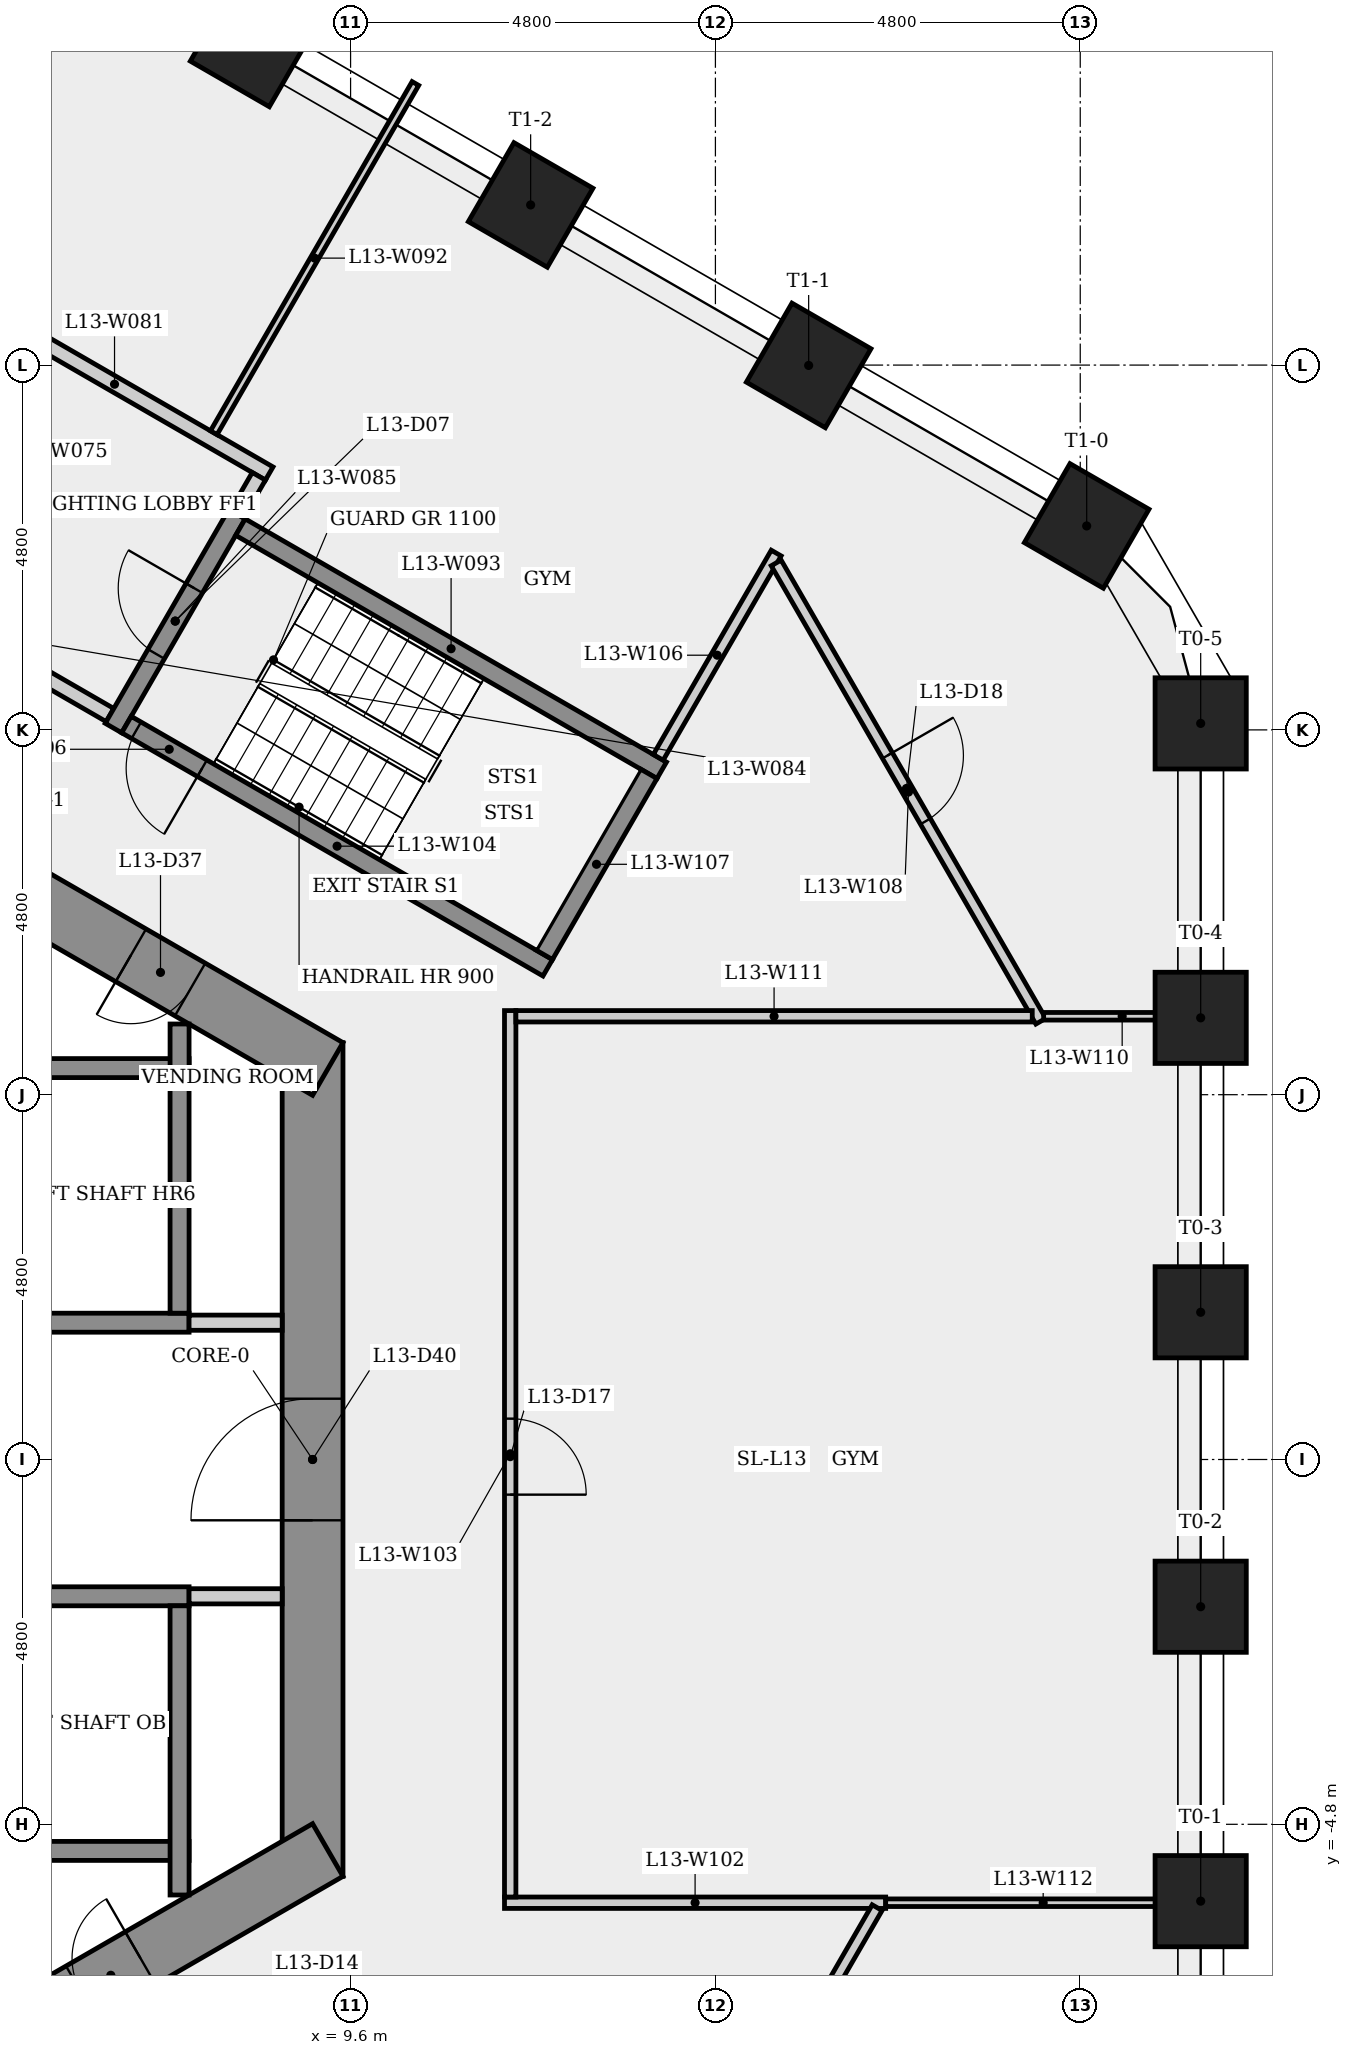
"""IFC4 building model, lengths in metres.
Left out: names, types, materials, properties, quantities, classifications, styles, units other than length and angle.
Written with IfcOpenShell. Run it as: python <this file> out.ifc"""

import sys

from ifc_helpers import new_model, si_unit, direction, frame, frame_2d, origin, origin_2d, place, context, subcontext, project, spatial, rectangle, extrude, element, fill, save


model = new_model("IFC4")
c1 = context("Model", 3, precision=1e-05, world=origin(), true_north=direction((0.0, 1.0)))
c2 = subcontext(c1, "Body", "Model", "MODEL_VIEW")
j1 = project(units=[si_unit("LENGTHUNIT", "METRE"), si_unit("PLANEANGLEUNIT", "RADIAN")], contexts=[c1])
p1 = place(None, origin())
s1 = spatial("IfcSite", under=j1, at=p1, CompositionType="ELEMENT")
p2 = place(p1, origin())
s2 = spatial("IfcBuilding", under=s1, at=p2, CompositionType="ELEMENT")
p3 = place(p2, frame((0.0, 0.0, 52.7)))
s3 = spatial("IfcBuildingStorey", under=s2, at=p3, CompositionType="ELEMENT", Elevation=52.7)
p4 = place(p3, frame((9.1, -5.485, 0.0), z_axis=(0.0, 0.0, 1.0), x_axis=(0.0, 1.0, 0.0)))
e1 = element("IfcWall", 1, at=p4, inside=s3, PredefinedType="SHEAR", context=c2, shape_type="SweptSolid", body=[
    extrude(rectangle(XDim=10.97, YDim=0.8, at=frame_2d((5.485, 0.0))), origin(), (0.0, 0.0, 1.0), 3.4),
])
p5 = place(p4, frame((4.685, 0.0, 0.0)))
e2 = element("IfcOpeningElement", 2, at=p5, cuts=e1, PredefinedType="OPENING", context=c2, shape_type="SweptSolid", body=[
    extrude(rectangle(XDim=1.6, YDim=2.1, at=frame_2d((0.8, 1.05))), frame((0.0, 0.41, 0.0), z_axis=(0.0, -1.0, 0.0), x_axis=(1.0, 0.0, 0.0)), (0.0, 0.0, 1.0), 0.82),
])
p6 = place(p3, frame((9.3, 5.138, 0.0), z_axis=(0.0, 0.0, 1.0), x_axis=(-0.866023993627, 0.500002442456, 0.0)))
e3 = element("IfcWall", 3, at=p6, inside=s3, PredefinedType="SHEAR", context=c2, shape_type="SweptSolid", body=[
    extrude(rectangle(XDim=10.97, YDim=0.8, at=frame_2d((5.485, 0.0))), origin(), (0.0, 0.0, 1.0), 3.4),
])
p7 = place(p6, frame((8.326, 0.0, 0.0)))
e4 = element("IfcOpeningElement", 4, at=p7, cuts=e3, PredefinedType="OPENING", context=c2, shape_type="SweptSolid", body=[
    extrude(rectangle(XDim=0.9, YDim=2.1, at=frame_2d((0.45, 1.05))), frame((0.0, 0.41, 0.0), z_axis=(0.0, -1.0, 0.0), x_axis=(1.0, 0.0, 0.0)), (0.0, 0.0, 1.0), 0.82),
])
p8 = place(p6, frame((2.091, 0.0, 0.0)))
e5 = element("IfcOpeningElement", 5, at=p8, cuts=e3, PredefinedType="OPENING", context=c2, shape_type="SweptSolid", body=[
    extrude(rectangle(XDim=0.9, YDim=2.1, at=frame_2d((0.45, 1.05))), frame((0.0, 0.41, 0.0), z_axis=(0.0, -1.0, 0.0), x_axis=(1.0, 0.0, 0.0)), (0.0, 0.0, 1.0), 0.82),
])
p9 = place(p3, frame((-0.2, -10.623, 0.0), z_axis=(0.0, 0.0, 1.0), x_axis=(0.866023993627, 0.500002442456, 0.0)))
e6 = element("IfcWall", 6, at=p9, inside=s3, PredefinedType="SHEAR", context=c2, shape_type="SweptSolid", body=[
    extrude(rectangle(XDim=10.97, YDim=0.8, at=frame_2d((5.485, 0.0))), origin(), (0.0, 0.0, 1.0), 3.4),
])
p10 = place(p9, frame((7.224, 0.0, 0.0)))
e7 = element("IfcOpeningElement", 7, at=p10, cuts=e6, PredefinedType="OPENING", context=c2, shape_type="SweptSolid", body=[
    extrude(rectangle(XDim=0.9, YDim=2.1, at=frame_2d((0.45, 1.05))), frame((0.0, 0.41, 0.0), z_axis=(0.0, -1.0, 0.0), x_axis=(1.0, 0.0, 0.0)), (0.0, 0.0, 1.0), 0.82),
])
for number, where, z_axis, x_axis in (
    (8, (20.785, -5.811, 0.0), (0.0, 0.0, 1.0), (1.0, 0.0, 0.0)),
    (9, (20.785, -1.937, 0.0), (0.0, 0.0, 1.0), (1.0, 0.0, 0.0)),
    (10, (20.785, 1.937, 0.0), (0.0, 0.0, 1.0), (1.0, 0.0, 0.0)),
    (11, (20.785, 5.811, 0.0), (0.0, 0.0, 1.0), (1.0, 0.0, 0.0)),
    (12, (20.785, 9.686, 0.0), (0.0, 0.0, 1.0), (1.0, 0.0, 0.0)),
    (13, (19.285, 12.283, 0.0), (0.0, 0.0, 1.0), (0.5, 0.866, 0.0)),
    (14, (15.627, 14.395, 0.0), (0.0, 0.0, 1.0), (0.5, 0.866, 0.0)),
    (15, (11.969, 16.507, 0.0), (0.0, 0.0, 1.0), (0.5, 0.866, 0.0)),
    (16, (8.311, 18.619, 0.0), (0.0, 0.0, 1.0), (0.5, 0.866, 0.0)),
):
    element("IfcColumn", number, at=place(p3, frame(where, z_axis=z_axis, x_axis=x_axis)), inside=s3, PredefinedType="COLUMN", context=c2, shape_type="SweptSolid", body=[
        extrude(rectangle(XDim=1.2, YDim=1.2, at=origin_2d()), origin(), (0.0, 0.0, 1.0), 3.4),
    ])
p11 = place(p3, frame((-7.475, 1.8, 0.0), z_axis=(0.0, 0.0, 1.0), x_axis=(1.0, 0.0, 0.0)))
e17 = element("IfcWall", 17, at=p11, inside=s3, PredefinedType="SHEAR", context=c2, shape_type="SweptSolid", body=[
    extrude(rectangle(XDim=14.95, YDim=0.25, at=frame_2d((7.475, 0.0))), origin(), (0.0, 0.0, 1.0), 3.05),
])
for number, where, z_axis, x_axis in (
    (18, (-7.225, 5.15, 0.0), (0.0, 0.0, 1.0), (1.0, 0.0, 0.0)),
    (19, (-7.225, -5.15, 0.0), (0.0, 0.0, 1.0), (1.0, 0.0, 0.0)),
):
    element("IfcWall", number, at=place(p3, frame(where, z_axis=z_axis, x_axis=x_axis)), inside=s3, PredefinedType="SHEAR", context=c2, shape_type="SweptSolid", body=[
        extrude(rectangle(XDim=14.7, YDim=0.25, at=frame_2d((7.35, 0.0))), origin(), (0.0, 0.0, 1.0), 3.05),
    ])
p12 = place(p3, frame((-7.225, -1.8, 0.0), z_axis=(0.0, 0.0, 1.0), x_axis=(1.0, 0.0, 0.0)))
e20 = element("IfcWall", 20, at=p12, inside=s3, PredefinedType="SHEAR", context=c2, shape_type="SweptSolid", body=[
    extrude(rectangle(XDim=14.7, YDim=0.25, at=frame_2d((7.35, 0.0))), origin(), (0.0, 0.0, 1.0), 3.05),
])
p13 = place(p12, frame((0.597, 0.0, 0.0)))
e21 = element("IfcOpeningElement", 21, at=p13, cuts=e20, PredefinedType="OPENING", context=c2, shape_type="SweptSolid", body=[
    extrude(rectangle(XDim=1.1, YDim=2.1, at=frame_2d((0.55, 1.05))), frame((0.0, 0.135, 0.0), z_axis=(0.0, -1.0, 0.0), x_axis=(1.0, 0.0, 0.0)), (0.0, 0.0, 1.0), 0.27),
])
p14 = place(p12, frame((3.0, 0.0, 0.0)))
e22 = element("IfcOpeningElement", 22, at=p14, cuts=e20, PredefinedType="OPENING", context=c2, shape_type="SweptSolid", body=[
    extrude(rectangle(XDim=1.1, YDim=2.1, at=frame_2d((0.55, 1.05))), frame((0.0, 0.135, 0.0), z_axis=(0.0, -1.0, 0.0), x_axis=(1.0, 0.0, 0.0)), (0.0, 0.0, 1.0), 0.27),
])
p15 = place(p12, frame((5.45, 0.0, 0.0)))
e23 = element("IfcOpeningElement", 23, at=p15, cuts=e20, PredefinedType="OPENING", context=c2, shape_type="SweptSolid", body=[
    extrude(rectangle(XDim=1.1, YDim=2.1, at=frame_2d((0.55, 1.05))), frame((0.0, 0.135, 0.0), z_axis=(0.0, -1.0, 0.0), x_axis=(1.0, 0.0, 0.0)), (0.0, 0.0, 1.0), 0.27),
])
p16 = place(p12, frame((7.9, 0.0, 0.0)))
e24 = element("IfcOpeningElement", 24, at=p16, cuts=e20, PredefinedType="OPENING", context=c2, shape_type="SweptSolid", body=[
    extrude(rectangle(XDim=1.1, YDim=2.1, at=frame_2d((0.55, 1.05))), frame((0.0, 0.135, 0.0), z_axis=(0.0, -1.0, 0.0), x_axis=(1.0, 0.0, 0.0)), (0.0, 0.0, 1.0), 0.27),
])
p17 = place(p12, frame((10.35, 0.0, 0.0)))
e25 = element("IfcOpeningElement", 25, at=p17, cuts=e20, PredefinedType="OPENING", context=c2, shape_type="SweptSolid", body=[
    extrude(rectangle(XDim=1.1, YDim=2.1, at=frame_2d((0.55, 1.05))), frame((0.0, 0.135, 0.0), z_axis=(0.0, -1.0, 0.0), x_axis=(1.0, 0.0, 0.0)), (0.0, 0.0, 1.0), 0.27),
])
p18 = place(p3, frame((4.459, 15.323, 0.0), z_axis=(0.0, 0.0, 1.0), x_axis=(0.866016039709, -0.500016218704, 0.0)))
e26 = element("IfcWall", 26, at=p18, inside=s3, PredefinedType="PARTITIONING", context=c2, shape_type="SweptSolid", body=[
    extrude(rectangle(XDim=4.7, YDim=0.2, at=frame_2d((2.35, 0.0))), origin(), (0.0, 0.0, 1.0), 3.05),
])
p19 = place(p3, frame((6.435, 9.795, 0.0), z_axis=(0.0, 0.0, 1.0), x_axis=(-0.866012907634, 0.500021643343, 0.0)))
e27 = element("IfcWall", 27, at=p19, inside=s3, PredefinedType="PARTITIONING", context=c2, shape_type="SweptSolid", body=[
    extrude(rectangle(XDim=4.45, YDim=0.2, at=frame_2d((2.225, 0.0))), origin(), (0.0, 0.0, 1.0), 3.05),
])
p20 = place(p19, frame((1.675, 0.0, 0.0)))
e28 = element("IfcOpeningElement", 28, at=p20, cuts=e27, PredefinedType="OPENING", context=c2, shape_type="SweptSolid", body=[
    extrude(rectangle(XDim=1.1, YDim=2.1, at=frame_2d((0.55, 1.05))), frame((0.0, 0.11, 0.0), z_axis=(0.0, -1.0, 0.0), x_axis=(1.0, 0.0, 0.0)), (0.0, 0.0, 1.0), 0.22),
])
p21 = place(p3, frame((6.48, 9.624, 0.0), z_axis=(0.0, 0.0, 1.0), x_axis=(0.500017246033, 0.866015446554, 0.0)))
e29 = element("IfcWall", 29, at=p21, inside=s3, PredefinedType="SHEAR", context=c2, shape_type="SweptSolid", body=[
    extrude(rectangle(XDim=3.25, YDim=0.25, at=frame_2d((1.625, 0.0))), origin(), (0.0, 0.0, 1.0), 3.05),
])
p22 = place(p21, frame((1.125, 0.0, 0.0)))
e30 = element("IfcOpeningElement", 30, at=p22, cuts=e29, PredefinedType="OPENING", context=c2, shape_type="SweptSolid", body=[
    extrude(rectangle(XDim=1.0, YDim=2.1, at=frame_2d((0.5, 1.05))), frame((0.0, 0.135, 0.0), z_axis=(0.0, -1.0, 0.0), x_axis=(1.0, 0.0, 0.0)), (0.0, 0.0, 1.0), 0.27),
])
p23 = place(p3, frame((7.475, 1.8, 0.0), z_axis=(0.0, 0.0, 1.0), x_axis=(1.0, 0.0, 0.0)))
e31 = element("IfcWall", 31, at=p23, inside=s3, PredefinedType="PARTITIONING", context=c2, shape_type="SweptSolid", body=[
    extrude(rectangle(XDim=1.225, YDim=0.2, at=frame_2d((0.613, 0.0))), origin(), (0.0, 0.0, 1.0), 3.05),
])
for number, where, z_axis, x_axis in (
    (32, (7.35, -1.925, 0.0), (0.0, 0.0, 1.0), (0.0, -1.0, 0.0)),
    (33, (7.35, 5.73, 0.0), (0.0, 0.0, 1.0), (0.0, -1.0, 0.0)),
):
    element("IfcWall", number, at=place(p3, frame(where, z_axis=z_axis, x_axis=x_axis)), inside=s3, PredefinedType="SHEAR", context=c2, shape_type="SweptSolid", body=[
        extrude(rectangle(XDim=3.805, YDim=0.25, at=frame_2d((1.903, 0.0))), origin(), (0.0, 0.0, 1.0), 3.05),
    ])
p24 = place(p3, frame((7.8, 13.51, 0.0), z_axis=(0.0, 0.0, 1.0), x_axis=(0.499989321821, 0.866031568746, 0.0)))
e34 = element("IfcWall", 34, at=p24, inside=s3, PredefinedType="PARTITIONING", context=c2, shape_type="SweptSolid", body=[
    extrude(rectangle(XDim=5.306, YDim=0.1, at=frame_2d((2.653, 0.0))), origin(), (0.0, 0.0, 1.0), 3.05),
])
p25 = place(p3, frame((8.151, 12.268, 0.0), z_axis=(0.0, 0.0, 1.0), x_axis=(0.866025499775, -0.499999833739, 0.0)))
e35 = element("IfcWall", 35, at=p25, inside=s3, PredefinedType="SHEAR", context=c2, shape_type="SweptSolid", body=[
    extrude(rectangle(XDim=6.4, YDim=0.25, at=frame_2d((3.2, 0.0))), origin(), (0.0, 0.0, 1.0), 3.05),
])
p26 = place(p3, frame((8.393, 12.937, 0.0), z_axis=(0.0, 0.0, 1.0), x_axis=(-0.500065409566, -0.86598763626, 0.0)))
e36 = element("IfcWall", 36, at=p26, inside=s3, PredefinedType="PARTITIONING", context=c2, shape_type="SweptSolid", body=[
    extrude(rectangle(XDim=0.575, YDim=0.2, at=frame_2d((0.288, 0.0))), origin(), (0.0, 0.0, 1.0), 3.05),
])
p27 = place(p3, frame((8.7, -1.8, 0.0), z_axis=(0.0, 0.0, 1.0), x_axis=(-1.0, 0.0, 0.0)))
e37 = element("IfcWall", 37, at=p27, inside=s3, PredefinedType="PARTITIONING", context=c2, shape_type="SweptSolid", body=[
    extrude(rectangle(XDim=1.225, YDim=0.2, at=frame_2d((0.613, 0.0))), origin(), (0.0, 0.0, 1.0), 3.05),
])
p28 = place(p3, frame((11.625, -5.832, 0.0), z_axis=(0.0, 0.0, 1.0), x_axis=(1.0, 0.0, 0.0)))
e38 = element("IfcWall", 38, at=p28, inside=s3, PredefinedType="PARTITIONING", context=c2, shape_type="SweptSolid", body=[
    extrude(rectangle(XDim=5.015, YDim=0.15, at=frame_2d((2.508, 0.0))), origin(), (0.0, 0.0, 1.0), 3.05),
])
p29 = place(p3, frame((11.7, 5.907, 0.0), z_axis=(0.0, 0.0, 1.0), x_axis=(0.0, -1.0, 0.0)))
e39 = element("IfcWall", 39, at=p29, inside=s3, PredefinedType="PARTITIONING", context=c2, shape_type="SweptSolid", body=[
    extrude(rectangle(XDim=11.664, YDim=0.15, at=frame_2d((5.832, 0.0))), origin(), (0.0, 0.0, 1.0), 3.05),
])
p30 = place(p29, frame((5.369, 0.0, 0.0)))
e40 = element("IfcOpeningElement", 40, at=p30, cuts=e39, PredefinedType="OPENING", context=c2, shape_type="SweptSolid", body=[
    extrude(rectangle(XDim=1.0, YDim=2.1, at=frame_2d((0.5, 1.05))), frame((0.0, 0.085, 0.0), z_axis=(0.0, -1.0, 0.0), x_axis=(1.0, 0.0, 0.0)), (0.0, 0.0, 1.0), 0.17),
])
p31 = place(p3, frame((12.194, 6.47, 0.0), z_axis=(0.0, 0.0, 1.0), x_axis=(-0.866025499775, 0.499999833739, 0.0)))
e41 = element("IfcWall", 41, at=p31, inside=s3, PredefinedType="SHEAR", context=c2, shape_type="SweptSolid", body=[
    extrude(rectangle(XDim=6.4, YDim=0.25, at=frame_2d((3.2, 0.0))), origin(), (0.0, 0.0, 1.0), 3.05),
])
p32 = place(p31, frame((5.25, 0.0, 0.0)))
e42 = element("IfcOpeningElement", 42, at=p32, cuts=e41, PredefinedType="OPENING", context=c2, shape_type="SweptSolid", body=[
    extrude(rectangle(XDim=1.0, YDim=2.1, at=frame_2d((0.5, 1.05))), frame((0.0, 0.135, 0.0), z_axis=(0.0, -1.0, 0.0), x_axis=(1.0, 0.0, 0.0)), (0.0, 0.0, 1.0), 0.27),
])
p33 = place(p3, frame((13.648, 9.239, 0.0), z_axis=(0.0, 0.0, 1.0), x_axis=(0.500022035744, 0.866012681068, 0.0)))
e43 = element("IfcWall", 43, at=p33, inside=s3, PredefinedType="PARTITIONING", context=c2, shape_type="SweptSolid", body=[
    extrude(rectangle(XDim=3.104, YDim=0.15, at=frame_2d((1.552, 0.0))), origin(), (0.0, 0.0, 1.0), 3.05),
])
p34 = place(p3, frame((13.523, 9.022, 0.0), z_axis=(0.0, 0.0, 1.0), x_axis=(-0.500034990121, -0.866005201286, 0.0)))
e44 = element("IfcWall", 44, at=p34, inside=s3, PredefinedType="SHEAR", context=c2, shape_type="SweptSolid", body=[
    extrude(rectangle(XDim=2.75, YDim=0.25, at=frame_2d((1.375, 0.0))), origin(), (0.0, 0.0, 1.0), 3.05),
])
p35 = place(p3, frame((15.2, 11.797, 0.0), z_axis=(0.0, 0.0, 1.0), x_axis=(0.500000675876, -0.866025013567, 0.0)))
e45 = element("IfcWall", 45, at=p35, inside=s3, PredefinedType="PARTITIONING", context=c2, shape_type="SweptSolid", body=[
    extrude(rectangle(XDim=6.963, YDim=0.15, at=frame_2d((3.481, 0.0))), origin(), (0.0, 0.0, 1.0), 3.05),
])
p36 = place(p35, frame((2.927, 0.0, 0.0)))
e46 = element("IfcOpeningElement", 46, at=p36, cuts=e45, PredefinedType="OPENING", context=c2, shape_type="SweptSolid", body=[
    extrude(rectangle(XDim=1.0, YDim=2.1, at=frame_2d((0.5, 1.05))), frame((0.0, 0.085, 0.0), z_axis=(0.0, -1.0, 0.0), x_axis=(1.0, 0.0, 0.0)), (0.0, 0.0, 1.0), 0.17),
])
p37 = place(p3, frame((16.528, -5.897, 0.0), z_axis=(0.0, 0.0, 1.0), x_axis=(-0.499988821041, -0.866031857863, 0.0)))
e47 = element("IfcWall", 47, at=p37, inside=s3, PredefinedType="PARTITIONING", context=c2, shape_type="SweptSolid", body=[
    extrude(rectangle(XDim=8.198, YDim=0.15, at=frame_2d((4.099, 0.0))), origin(), (0.0, 0.0, 1.0), 3.05),
])
p38 = place(p37, frame((3.599, 0.0, 0.0)))
e48 = element("IfcOpeningElement", 48, at=p38, cuts=e47, PredefinedType="OPENING", context=c2, shape_type="SweptSolid", body=[
    extrude(rectangle(XDim=1.0, YDim=2.1, at=frame_2d((0.5, 1.05))), frame((0.0, 0.085, 0.0), z_axis=(0.0, -1.0, 0.0), x_axis=(1.0, 0.0, 0.0)), (0.0, 0.0, 1.0), 0.17),
])
p39 = place(p3, frame((18.719, 5.832, 0.0), z_axis=(0.0, 0.0, 1.0), x_axis=(1.0, 0.0, 0.0)))
e49 = element("IfcWall", 49, at=p39, inside=s3, PredefinedType="PARTITIONING", context=c2, shape_type="SweptSolid", body=[
    extrude(rectangle(XDim=2.066, YDim=0.1, at=frame_2d((1.033, 0.0))), origin(), (0.0, 0.0, 1.0), 3.05),
])
p40 = place(p3, frame((18.569, 5.832, 0.0), z_axis=(0.0, 0.0, 1.0), x_axis=(-1.0, 0.0, 0.0)))
e50 = element("IfcWall", 50, at=p40, inside=s3, PredefinedType="PARTITIONING", context=c2, shape_type="SweptSolid", body=[
    extrude(rectangle(XDim=6.794, YDim=0.15, at=frame_2d((3.397, 0.0))), origin(), (0.0, 0.0, 1.0), 3.05),
])
p41 = place(p3, frame((20.785, -5.832, 0.0), z_axis=(0.0, 0.0, 1.0), x_axis=(-1.0, 0.0, 0.0)))
e51 = element("IfcWall", 51, at=p41, inside=s3, PredefinedType="PARTITIONING", context=c2, shape_type="SweptSolid", body=[
    extrude(rectangle(XDim=4.145, YDim=0.1, at=frame_2d((2.072, 0.0))), origin(), (0.0, 0.0, 1.0), 3.05),
])
p42 = place(p32, origin())
e52 = element("IfcDoor", 52, at=p42, inside=s3, OperationType="SINGLE_SWING_LEFT", PredefinedType="DOOR", context=c2, shape_type="SweptSolid", body=[
    extrude(rectangle(XDim=1.0, YDim=2.1, at=frame_2d((0.5, 1.05))), frame((0.0, 0.025, 0.0), z_axis=(0.0, -1.0, 0.0), x_axis=(1.0, 0.0, 0.0)), (0.0, 0.0, 1.0), 0.05),
])
fill(e42, e52)
p43 = place(p22, origin())
e53 = element("IfcDoor", 53, at=p43, inside=s3, OperationType="SINGLE_SWING_RIGHT", PredefinedType="DOOR", context=c2, shape_type="SweptSolid", body=[
    extrude(rectangle(XDim=1.0, YDim=2.1, at=frame_2d((0.5, 1.05))), frame((0.0, 0.025, 0.0), z_axis=(0.0, -1.0, 0.0), x_axis=(1.0, 0.0, 0.0)), (0.0, 0.0, 1.0), 0.05),
])
fill(e30, e53)
p44 = place(p30, origin())
e54 = element("IfcDoor", 54, at=p44, inside=s3, OperationType="SINGLE_SWING_RIGHT", PredefinedType="DOOR", context=c2, shape_type="SweptSolid", body=[
    extrude(rectangle(XDim=1.0, YDim=2.1, at=frame_2d((0.5, 1.05))), frame((0.0, 0.025, 0.0), z_axis=(0.0, -1.0, 0.0), x_axis=(1.0, 0.0, 0.0)), (0.0, 0.0, 1.0), 0.05),
])
fill(e40, e54)
p45 = place(p36, origin())
e55 = element("IfcDoor", 55, at=p45, inside=s3, OperationType="SINGLE_SWING_LEFT", PredefinedType="DOOR", context=c2, shape_type="SweptSolid", body=[
    extrude(rectangle(XDim=1.0, YDim=2.1, at=frame_2d((0.5, 1.05))), frame((0.0, 0.025, 0.0), z_axis=(0.0, -1.0, 0.0), x_axis=(1.0, 0.0, 0.0)), (0.0, 0.0, 1.0), 0.05),
])
fill(e46, e55)
p46 = place(p8, origin())
e56 = element("IfcDoor", 56, at=p46, inside=s3, OperationType="SINGLE_SWING_RIGHT", PredefinedType="DOOR", context=c2, shape_type="SweptSolid", body=[
    extrude(rectangle(XDim=0.9, YDim=2.1, at=frame_2d((0.45, 1.05))), frame((0.0, 0.025, 0.0), z_axis=(0.0, -1.0, 0.0), x_axis=(1.0, 0.0, 0.0)), (0.0, 0.0, 1.0), 0.05),
])
fill(e5, e56)
p47 = place(p10, origin())
e57 = element("IfcDoor", 57, at=p47, inside=s3, OperationType="SINGLE_SWING_RIGHT", PredefinedType="DOOR", context=c2, shape_type="SweptSolid", body=[
    extrude(rectangle(XDim=0.9, YDim=2.1, at=frame_2d((0.45, 1.05))), frame((0.0, 0.025, 0.0), z_axis=(0.0, -1.0, 0.0), x_axis=(1.0, 0.0, 0.0)), (0.0, 0.0, 1.0), 0.05),
])
fill(e7, e57)
p48 = place(p5, origin())
e58 = element("IfcDoor", 58, at=p48, inside=s3, OperationType="SINGLE_SWING_LEFT", PredefinedType="DOOR", context=c2, shape_type="SweptSolid", body=[
    extrude(rectangle(XDim=1.6, YDim=2.1, at=frame_2d((0.8, 1.05))), frame((0.0, 0.025, 0.0), z_axis=(0.0, -1.0, 0.0), x_axis=(1.0, 0.0, 0.0)), (0.0, 0.0, 1.0), 0.05),
])
fill(e2, e58)
save(model, sys.argv[1])
